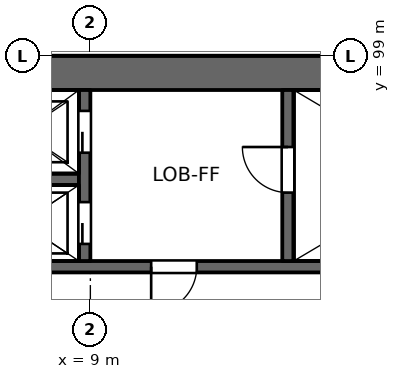
"""IFC4 building model, lengths in metres.
Left out: names, types, materials, properties, quantities, classifications, styles, units other than length and angle.
Written with IfcOpenShell. Run it as: python <this file> out.ifc"""

import sys

from ifc_helpers import new_model, si_unit, direction, frame, frame_2d, origin, place, context, subcontext, project, spatial, rectangle, extrude, element, fill, save


model = new_model("IFC4")
c1 = context("Model", 3, precision=1e-05, world=origin(), true_north=direction((0.0, 1.0)))
c2 = subcontext(c1, "Body", "Model", "MODEL_VIEW")
j1 = project(units=[si_unit("LENGTHUNIT", "METRE"), si_unit("PLANEANGLEUNIT", "RADIAN")], contexts=[c1])
p1 = place(None, origin())
s1 = spatial("IfcSite", under=j1, at=p1, CompositionType="ELEMENT")
p2 = place(p1, origin())
s2 = spatial("IfcBuilding", under=s1, at=p2, CompositionType="ELEMENT")
p3 = place(p2, frame((0.0, 0.0, 299.3)))
s3 = spatial("IfcBuildingStorey", under=s2, at=p3, CompositionType="ELEMENT", Elevation=299.3)
p4 = place(p3, frame((49.5, 98.55, 0.0), z_axis=(0.0, 0.0, 1.0), x_axis=(-1.0, 0.0, 0.0)))
e1 = element("IfcWall", 1, at=p4, inside=s3, PredefinedType="SHEAR", context=c2, shape_type="SweptSolid", body=[
    extrude(rectangle(XDim=45.0, YDim=0.9, at=frame_2d((22.5, 0.0))), origin(), (0.0, 0.0, 1.0), 3.7),
])
p5 = place(p3, frame((0.9, 93.45, -0.4), z_axis=(0.0, 0.0, 1.0), x_axis=(1.0, 0.0, 0.0)))
e2 = element("IfcWall", 2, at=p5, inside=s3, PredefinedType="SOLIDWALL", context=c2, shape_type="SweptSolid", body=[
    extrude(rectangle(XDim=34.6, YDim=0.3, at=frame_2d((17.3, 0.0))), origin(), (0.0, 0.0, 1.0), 3.65),
])
p6 = place(p5, frame((9.7, 0.0, 0.4)))
e3 = element("IfcOpeningElement", 3, at=p6, cuts=e2, PredefinedType="OPENING", context=c2, shape_type="SweptSolid", body=[
    extrude(rectangle(XDim=1.2, YDim=2.1, at=frame_2d((0.6, 1.05))), frame((0.0, 0.15, 0.0), z_axis=(0.0, -1.0, 0.0), x_axis=(1.0, 0.0, 0.0)), (0.0, 0.0, 1.0), 0.3),
])
p7 = place(p5, frame((24.3, 0.0, 0.4)))
e4 = element("IfcOpeningElement", 4, at=p7, cuts=e2, PredefinedType="OPENING", context=c2, shape_type="SweptSolid", body=[
    extrude(rectangle(XDim=1.0, YDim=2.1, at=frame_2d((0.5, 1.05))), frame((0.0, 0.15, 0.0), z_axis=(0.0, -1.0, 0.0), x_axis=(1.0, 0.0, 0.0)), (0.0, 0.0, 1.0), 0.3),
])
p8 = place(p5, frame((31.125, 0.0, 0.4)))
e5 = element("IfcOpeningElement", 5, at=p8, cuts=e2, PredefinedType="OPENING", context=c2, shape_type="SweptSolid", body=[
    extrude(rectangle(XDim=1.0, YDim=2.1, at=frame_2d((0.5, 1.05))), frame((0.0, 0.15, 0.0), z_axis=(0.0, -1.0, 0.0), x_axis=(1.0, 0.0, 0.0)), (0.0, 0.0, 1.0), 0.3),
])
p9 = place(p3, frame((5.7, 95.75, -0.4), z_axis=(0.0, 0.0, 1.0), x_axis=(1.0, 0.0, 0.0)))
e6 = element("IfcWall", 6, at=p9, inside=s3, PredefinedType="SOLIDWALL", context=c2, shape_type="SweptSolid", body=[
    extrude(rectangle(XDim=3.0, YDim=0.3, at=frame_2d((1.5, 0.0))), origin(), (0.0, 0.0, 1.0), 3.65),
])
p10 = place(p3, frame((8.85, 93.6, -0.4), z_axis=(0.0, 0.0, 1.0), x_axis=(0.0, 1.0, 0.0)))
e7 = element("IfcWall", 7, at=p10, inside=s3, PredefinedType="SOLIDWALL", context=c2, shape_type="SweptSolid", body=[
    extrude(rectangle(XDim=4.5, YDim=0.3, at=frame_2d((2.25, 0.0))), origin(), (0.0, 0.0, 1.0), 3.65),
])
p11 = place(p10, frame((0.45, 0.0, 0.4)))
e8 = element("IfcOpeningElement", 8, at=p11, cuts=e7, PredefinedType="OPENING", context=c2, shape_type="SweptSolid", body=[
    extrude(rectangle(XDim=1.1, YDim=2.1, at=frame_2d((0.55, 1.05))), frame((0.0, 0.15, 0.0), z_axis=(0.0, -1.0, 0.0), x_axis=(1.0, 0.0, 0.0)), (0.0, 0.0, 1.0), 0.3),
])
p12 = place(p10, frame((2.85, 0.0, 0.4)))
e9 = element("IfcOpeningElement", 9, at=p12, cuts=e7, PredefinedType="OPENING", context=c2, shape_type="SweptSolid", body=[
    extrude(rectangle(XDim=1.1, YDim=2.1, at=frame_2d((0.55, 1.05))), frame((0.0, 0.15, 0.0), z_axis=(0.0, -1.0, 0.0), x_axis=(1.0, 0.0, 0.0)), (0.0, 0.0, 1.0), 0.3),
])
p13 = place(p3, frame((14.2, 93.6, -0.4), z_axis=(0.0, 0.0, 1.0), x_axis=(0.0, 1.0, 0.0)))
e10 = element("IfcWall", 10, at=p13, inside=s3, PredefinedType="SOLIDWALL", context=c2, shape_type="SweptSolid", body=[
    extrude(rectangle(XDim=4.5, YDim=0.3, at=frame_2d((2.25, 0.0))), origin(), (0.0, 0.0, 1.0), 3.65),
])
p14 = place(p13, frame((1.8, 0.0, 0.4)))
e11 = element("IfcOpeningElement", 11, at=p14, cuts=e10, PredefinedType="OPENING", context=c2, shape_type="SweptSolid", body=[
    extrude(rectangle(XDim=1.2, YDim=2.1, at=frame_2d((0.6, 1.05))), frame((0.0, 0.15, 0.0), z_axis=(0.0, -1.0, 0.0), x_axis=(1.0, 0.0, 0.0)), (0.0, 0.0, 1.0), 0.3),
])
p15 = place(p11, origin())
e12 = element("IfcDoor", 12, at=p15, inside=s3, OperationType="SLIDING_TO_RIGHT", PredefinedType="DOOR", context=c2, shape_type="SweptSolid", body=[
    extrude(rectangle(XDim=1.1, YDim=2.1, at=frame_2d((0.55, 1.05))), frame((0.0, 0.025, 0.0), z_axis=(0.0, -1.0, 0.0), x_axis=(1.0, 0.0, 0.0)), (0.0, 0.0, 1.0), 0.05),
])
fill(e8, e12)
p16 = place(p12, origin())
e13 = element("IfcDoor", 13, at=p16, inside=s3, OperationType="SLIDING_TO_LEFT", PredefinedType="DOOR", context=c2, shape_type="SweptSolid", body=[
    extrude(rectangle(XDim=1.1, YDim=2.1, at=frame_2d((0.55, 1.05))), frame((0.0, 0.025, 0.0), z_axis=(0.0, -1.0, 0.0), x_axis=(1.0, 0.0, 0.0)), (0.0, 0.0, 1.0), 0.05),
])
fill(e9, e13)
p17 = place(p6, frame((1.2, 0.0, 0.0), z_axis=(0.0, 0.0, 1.0), x_axis=(-1.0, 0.0, 0.0)))
e14 = element("IfcDoor", 14, at=p17, inside=s3, OperationType="SINGLE_SWING_RIGHT", PredefinedType="DOOR", context=c2, shape_type="SweptSolid", body=[
    extrude(rectangle(XDim=1.2, YDim=2.1, at=frame_2d((0.6, 1.05))), frame((0.0, 0.025, 0.0), z_axis=(0.0, -1.0, 0.0), x_axis=(1.0, 0.0, 0.0)), (0.0, 0.0, 1.0), 0.05),
])
fill(e3, e14)
p18 = place(p14, origin())
e15 = element("IfcDoor", 15, at=p18, inside=s3, OperationType="SINGLE_SWING_RIGHT", PredefinedType="DOOR", context=c2, shape_type="SweptSolid", body=[
    extrude(rectangle(XDim=1.2, YDim=2.1, at=frame_2d((0.6, 1.05))), frame((0.0, 0.025, 0.0), z_axis=(0.0, -1.0, 0.0), x_axis=(1.0, 0.0, 0.0)), (0.0, 0.0, 1.0), 0.05),
])
fill(e11, e15)
save(model, sys.argv[1])
